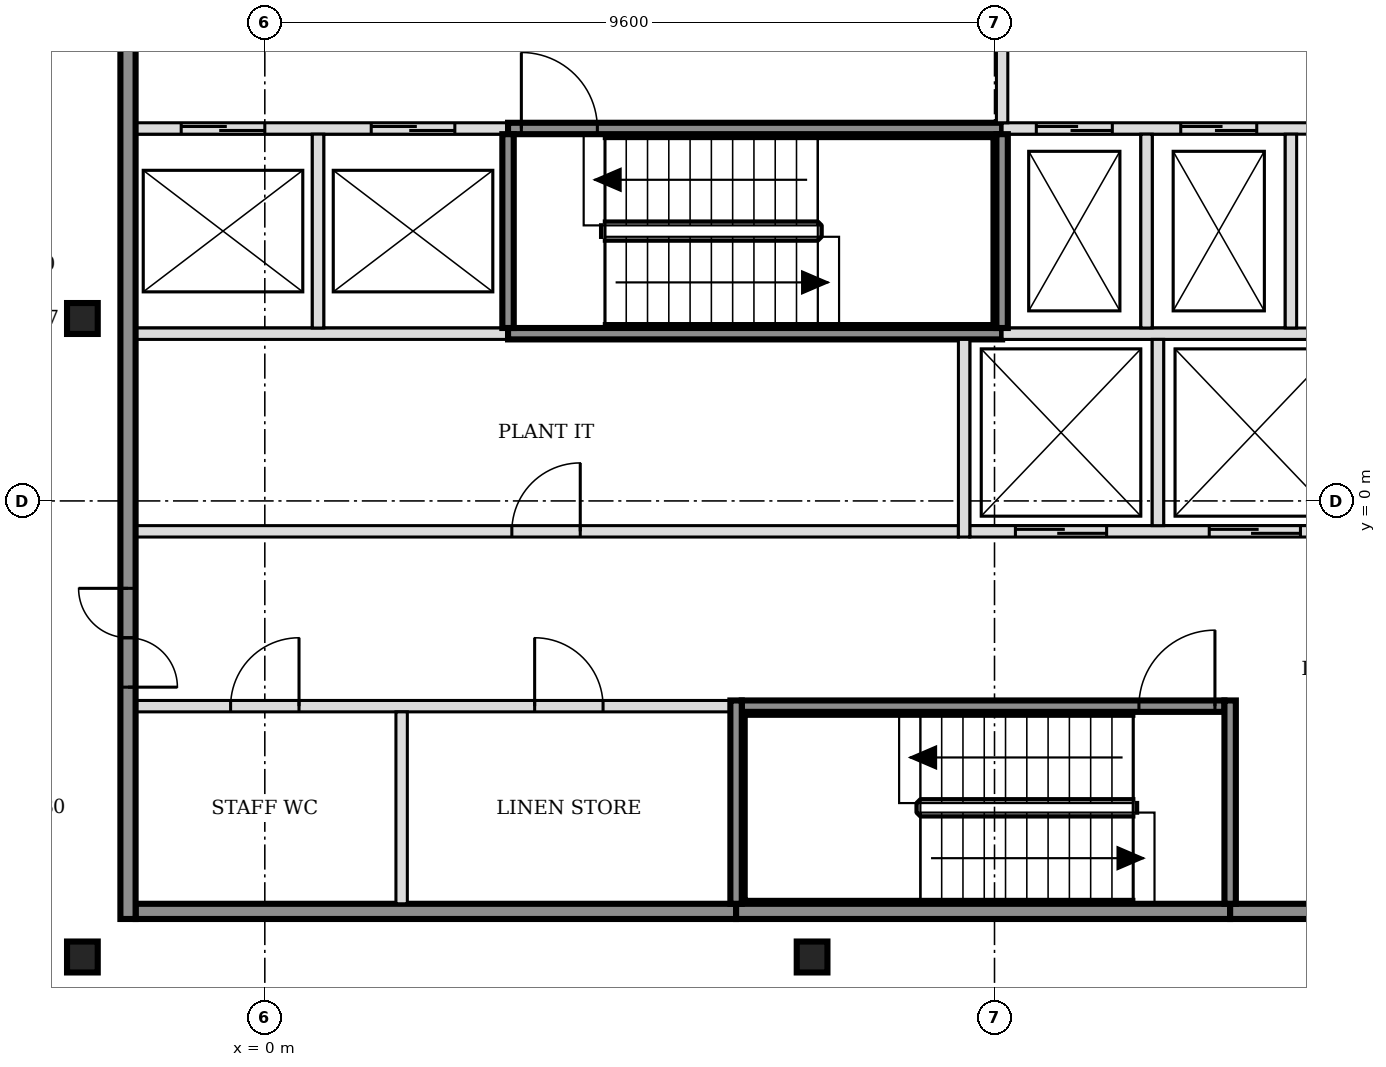
"""IFC4 building model, lengths in metres.
Left out: names, types, materials, properties, quantities, classifications, styles, units other than length and angle.
Written with IfcOpenShell. Run it as: python <this file> out.ifc"""

import sys

from ifc_helpers import new_model, si_unit, direction, frame, frame_2d, origin, origin_2d, place, context, subcontext, project, spatial, rectangle, i_section, extrude, element, fill, save


model = new_model("IFC4")
c1 = context("Model", 3, precision=1e-05, world=origin(), true_north=direction((0.0, 1.0)))
c2 = subcontext(c1, "Body", "Model", "MODEL_VIEW")
j1 = project(units=[si_unit("LENGTHUNIT", "METRE"), si_unit("PLANEANGLEUNIT", "RADIAN")], contexts=[c1])
p1 = place(None, origin())
s1 = spatial("IfcSite", under=j1, at=p1, CompositionType="ELEMENT")
p2 = place(p1, origin())
s2 = spatial("IfcBuilding", under=s1, at=p2, CompositionType="ELEMENT")
p3 = place(p2, frame((0.0, 0.0, 217.8)))
s3 = spatial("IfcBuildingStorey", under=s2, at=p3, CompositionType="ELEMENT", Elevation=217.8)
for number, where, z_axis, x_axis in (
    (1, (-2.4, -6.0, -0.15), (0.0, 0.0, 1.0), (1.0, 0.0, 0.0)),
    (2, (7.2, -6.0, -0.15), (0.0, 0.0, 1.0), (1.0, 0.0, 0.0)),
    (3, (-2.4, 2.4, -0.15), (0.0, 0.0, 1.0), (1.0, 0.0, 0.0)),
):
    element("IfcColumn", number, at=place(p3, frame(where, z_axis=z_axis, x_axis=x_axis)), inside=s3, PredefinedType="COLUMN", context=c2, shape_type="SweptSolid", body=[
        extrude(i_section(OverallWidth=0.404, OverallDepth=0.407, WebThickness=0.027, FlangeThickness=0.044, FilletRadius=0.015, at=origin_2d()), origin(), (0.0, 0.0, 1.0), 3.6),
    ])
p4 = place(p3, frame((-1.7, -5.4, 0.0), z_axis=(0.0, 0.0, 1.0), x_axis=(1.0, 0.0, 0.0)))
e4 = element("IfcWall", 4, at=p4, inside=s3, PredefinedType="SOLIDWALL", context=c2, shape_type="SweptSolid", body=[
    extrude(rectangle(XDim=7.9, YDim=0.2, at=frame_2d((3.95, 0.0))), origin(), (0.0, 0.0, 1.0), 3.45),
])
p5 = place(p3, frame((6.2, -5.4, 0.0), z_axis=(0.0, 0.0, 1.0), x_axis=(1.0, 0.0, 0.0)))
e5 = element("IfcWall", 5, at=p5, inside=s3, PredefinedType="SOLIDWALL", context=c2, shape_type="SweptSolid", body=[
    extrude(rectangle(XDim=6.5, YDim=0.2, at=frame_2d((3.25, 0.0))), origin(), (0.0, 0.0, 1.0), 3.45),
])
p6 = place(p3, frame((12.7, -5.4, 0.0), z_axis=(0.0, 0.0, 1.0), x_axis=(1.0, 0.0, 0.0)))
e6 = element("IfcWall", 6, at=p6, inside=s3, PredefinedType="SOLIDWALL", context=c2, shape_type="SweptSolid", body=[
    extrude(rectangle(XDim=3.4, YDim=0.2, at=frame_2d((1.7, 0.0))), origin(), (0.0, 0.0, 1.0), 3.45),
])
p7 = place(p3, frame((-1.7, -2.7, 0.0), z_axis=(0.0, 0.0, 1.0), x_axis=(1.0, 0.0, 0.0)))
e7 = element("IfcWall", 7, at=p7, inside=s3, PredefinedType="PARTITIONING", context=c2, shape_type="SweptSolid", body=[
    extrude(rectangle(XDim=7.825, YDim=0.15, at=frame_2d((3.913, 0.0))), origin(), (0.0, 0.0, 1.0), 3.45),
])
p8 = place(p7, frame((1.25, 0.0, 0.0)))
e8 = element("IfcOpeningElement", 8, at=p8, cuts=e7, PredefinedType="OPENING", context=c2, shape_type="SweptSolid", body=[
    extrude(rectangle(XDim=0.9, YDim=2.1, at=frame_2d((0.45, 1.05))), frame((0.0, 0.085, 0.0), z_axis=(0.0, -1.0, 0.0), x_axis=(1.0, 0.0, 0.0)), (0.0, 0.0, 1.0), 0.17),
])
p9 = place(p7, frame((5.25, 0.0, 0.0)))
e9 = element("IfcOpeningElement", 9, at=p9, cuts=e7, PredefinedType="OPENING", context=c2, shape_type="SweptSolid", body=[
    extrude(rectangle(XDim=0.9, YDim=2.1, at=frame_2d((0.45, 1.05))), frame((0.0, 0.085, 0.0), z_axis=(0.0, -1.0, 0.0), x_axis=(1.0, 0.0, 0.0)), (0.0, 0.0, 1.0), 0.17),
])
p10 = place(p3, frame((6.275, -2.7, 0.0), z_axis=(0.0, 0.0, 1.0), x_axis=(1.0, 0.0, 0.0)))
e10 = element("IfcWall", 10, at=p10, inside=s3, PredefinedType="SOLIDWALL", context=c2, shape_type="SweptSolid", body=[
    extrude(rectangle(XDim=6.35, YDim=0.15, at=frame_2d((3.175, 0.0))), origin(), (0.0, 0.0, 1.0), 3.45),
])
p11 = place(p10, frame((5.225, 0.0, 0.0)))
e11 = element("IfcOpeningElement", 11, at=p11, cuts=e10, PredefinedType="OPENING", context=c2, shape_type="SweptSolid", body=[
    extrude(rectangle(XDim=1.0, YDim=2.1, at=frame_2d((0.5, 1.05))), frame((0.0, 0.085, 0.0), z_axis=(0.0, -1.0, 0.0), x_axis=(1.0, 0.0, 0.0)), (0.0, 0.0, 1.0), 0.17),
])
p12 = place(p3, frame((-1.7, -0.4, 0.0), z_axis=(0.0, 0.0, 1.0), x_axis=(1.0, 0.0, 0.0)))
e12 = element("IfcWall", 12, at=p12, inside=s3, PredefinedType="PARTITIONING", context=c2, shape_type="SweptSolid", body=[
    extrude(rectangle(XDim=10.825, YDim=0.15, at=frame_2d((5.413, 0.0))), origin(), (0.0, 0.0, 1.0), 3.45),
])
p13 = place(p12, frame((4.95, 0.0, 0.0)))
e13 = element("IfcOpeningElement", 13, at=p13, cuts=e12, PredefinedType="OPENING", context=c2, shape_type="SweptSolid", body=[
    extrude(rectangle(XDim=0.9, YDim=2.1, at=frame_2d((0.45, 1.05))), frame((0.0, 0.085, 0.0), z_axis=(0.0, -1.0, 0.0), x_axis=(1.0, 0.0, 0.0)), (0.0, 0.0, 1.0), 0.17),
])
p14 = place(p3, frame((9.275, -0.4, 0.0), z_axis=(0.0, 0.0, 1.0), x_axis=(1.0, 0.0, 0.0)))
e14 = element("IfcWall", 14, at=p14, inside=s3, PredefinedType="SOLIDWALL", context=c2, shape_type="SweptSolid", body=[
    extrude(rectangle(XDim=4.95, YDim=0.15, at=frame_2d((2.475, 0.0))), origin(), (0.0, 0.0, 1.0), 3.45),
])
p15 = place(p14, frame((0.6, 0.0, 0.0)))
e15 = element("IfcOpeningElement", 15, at=p15, cuts=e14, PredefinedType="OPENING", context=c2, shape_type="SweptSolid", body=[
    extrude(rectangle(XDim=1.2, YDim=2.1, at=frame_2d((0.6, 1.05))), frame((0.0, 0.085, 0.0), z_axis=(0.0, -1.0, 0.0), x_axis=(1.0, 0.0, 0.0)), (0.0, 0.0, 1.0), 0.17),
])
p16 = place(p14, frame((3.15, 0.0, 0.0)))
e16 = element("IfcOpeningElement", 16, at=p16, cuts=e14, PredefinedType="OPENING", context=c2, shape_type="SweptSolid", body=[
    extrude(rectangle(XDim=1.2, YDim=2.1, at=frame_2d((0.6, 1.05))), frame((0.0, 0.085, 0.0), z_axis=(0.0, -1.0, 0.0), x_axis=(1.0, 0.0, 0.0)), (0.0, 0.0, 1.0), 0.17),
])
p17 = place(p3, frame((-1.7, 2.2, 0.0), z_axis=(0.0, 0.0, 1.0), x_axis=(1.0, 0.0, 0.0)))
e17 = element("IfcWall", 17, at=p17, inside=s3, PredefinedType="SOLIDWALL", context=c2, shape_type="SweptSolid", body=[
    extrude(rectangle(XDim=4.9, YDim=0.15, at=frame_2d((2.45, 0.0))), origin(), (0.0, 0.0, 1.0), 3.45),
])
p18 = place(p3, frame((3.2, 2.2, 0.0), z_axis=(0.0, 0.0, 1.0), x_axis=(1.0, 0.0, 0.0)))
e18 = element("IfcWall", 18, at=p18, inside=s3, PredefinedType="SOLIDWALL", context=c2, shape_type="SweptSolid", body=[
    extrude(rectangle(XDim=6.5, YDim=0.15, at=frame_2d((3.25, 0.0))), origin(), (0.0, 0.0, 1.0), 3.45),
])
p19 = place(p3, frame((9.7, 2.2, 0.0), z_axis=(0.0, 0.0, 1.0), x_axis=(1.0, 0.0, 0.0)))
e19 = element("IfcWall", 19, at=p19, inside=s3, PredefinedType="SOLIDWALL", context=c2, shape_type="SweptSolid", body=[
    extrude(rectangle(XDim=4.525, YDim=0.15, at=frame_2d((2.263, 0.0))), origin(), (0.0, 0.0, 1.0), 3.45),
])
p20 = place(p3, frame((-1.7, 4.9, 0.0), z_axis=(0.0, 0.0, 1.0), x_axis=(1.0, 0.0, 0.0)))
e20 = element("IfcWall", 20, at=p20, inside=s3, PredefinedType="SOLIDWALL", context=c2, shape_type="SweptSolid", body=[
    extrude(rectangle(XDim=4.9, YDim=0.15, at=frame_2d((2.45, 0.0))), origin(), (0.0, 0.0, 1.0), 3.45),
])
p21 = place(p20, frame((0.6, 0.0, 0.0)))
e21 = element("IfcOpeningElement", 21, at=p21, cuts=e20, PredefinedType="OPENING", context=c2, shape_type="SweptSolid", body=[
    extrude(rectangle(XDim=1.1, YDim=2.1, at=frame_2d((0.55, 1.05))), frame((0.0, 0.085, 0.0), z_axis=(0.0, -1.0, 0.0), x_axis=(1.0, 0.0, 0.0)), (0.0, 0.0, 1.0), 0.17),
])
p22 = place(p20, frame((3.1, 0.0, 0.0)))
e22 = element("IfcOpeningElement", 22, at=p22, cuts=e20, PredefinedType="OPENING", context=c2, shape_type="SweptSolid", body=[
    extrude(rectangle(XDim=1.1, YDim=2.1, at=frame_2d((0.55, 1.05))), frame((0.0, 0.085, 0.0), z_axis=(0.0, -1.0, 0.0), x_axis=(1.0, 0.0, 0.0)), (0.0, 0.0, 1.0), 0.17),
])
p23 = place(p3, frame((3.2, 4.9, 0.0), z_axis=(0.0, 0.0, 1.0), x_axis=(1.0, 0.0, 0.0)))
e23 = element("IfcWall", 23, at=p23, inside=s3, PredefinedType="SOLIDWALL", context=c2, shape_type="SweptSolid", body=[
    extrude(rectangle(XDim=6.5, YDim=0.15, at=frame_2d((3.25, 0.0))), origin(), (0.0, 0.0, 1.0), 3.45),
])
p24 = place(p23, frame((0.175, 0.0, 0.0)))
e24 = element("IfcOpeningElement", 24, at=p24, cuts=e23, PredefinedType="OPENING", context=c2, shape_type="SweptSolid", body=[
    extrude(rectangle(XDim=1.0, YDim=2.1, at=frame_2d((0.5, 1.05))), frame((0.0, 0.085, 0.0), z_axis=(0.0, -1.0, 0.0), x_axis=(1.0, 0.0, 0.0)), (0.0, 0.0, 1.0), 0.17),
])
p25 = place(p3, frame((9.7, 4.9, 0.0), z_axis=(0.0, 0.0, 1.0), x_axis=(1.0, 0.0, 0.0)))
e25 = element("IfcWall", 25, at=p25, inside=s3, PredefinedType="SOLIDWALL", context=c2, shape_type="SweptSolid", body=[
    extrude(rectangle(XDim=6.4, YDim=0.15, at=frame_2d((3.2, 0.0))), origin(), (0.0, 0.0, 1.0), 3.45),
])
p26 = place(p25, frame((0.45, 0.0, 0.0)))
e26 = element("IfcOpeningElement", 26, at=p26, cuts=e25, PredefinedType="OPENING", context=c2, shape_type="SweptSolid", body=[
    extrude(rectangle(XDim=1.0, YDim=2.1, at=frame_2d((0.5, 1.05))), frame((0.0, 0.085, 0.0), z_axis=(0.0, -1.0, 0.0), x_axis=(1.0, 0.0, 0.0)), (0.0, 0.0, 1.0), 0.17),
])
p27 = place(p25, frame((2.35, 0.0, 0.0)))
e27 = element("IfcOpeningElement", 27, at=p27, cuts=e25, PredefinedType="OPENING", context=c2, shape_type="SweptSolid", body=[
    extrude(rectangle(XDim=1.0, YDim=2.1, at=frame_2d((0.5, 1.05))), frame((0.0, 0.085, 0.0), z_axis=(0.0, -1.0, 0.0), x_axis=(1.0, 0.0, 0.0)), (0.0, 0.0, 1.0), 0.17),
])
p28 = place(p25, frame((4.7, 0.0, 0.0)))
e28 = element("IfcOpeningElement", 28, at=p28, cuts=e25, PredefinedType="OPENING", context=c2, shape_type="SweptSolid", body=[
    extrude(rectangle(XDim=0.9, YDim=2.1, at=frame_2d((0.45, 1.05))), frame((0.0, 0.085, 0.0), z_axis=(0.0, -1.0, 0.0), x_axis=(1.0, 0.0, 0.0)), (0.0, 0.0, 1.0), 0.17),
])
p29 = place(p3, frame((-1.8, -5.5, 0.0), z_axis=(0.0, 0.0, 1.0), x_axis=(0.0, 1.0, 0.0)))
e29 = element("IfcWall", 29, at=p29, inside=s3, PredefinedType="SOLIDWALL", context=c2, shape_type="SweptSolid", body=[
    extrude(rectangle(XDim=15.8, YDim=0.2, at=frame_2d((7.9, 0.0))), origin(), (0.0, 0.0, 1.0), 3.45),
])
p30 = place(p29, frame((3.05, 0.0, 0.0)))
e30 = element("IfcOpeningElement", 30, at=p30, cuts=e29, PredefinedType="OPENING", context=c2, shape_type="SweptSolid", body=[
    extrude(rectangle(XDim=1.3, YDim=2.1, at=frame_2d((0.65, 1.05))), frame((0.0, 0.11, 0.0), z_axis=(0.0, -1.0, 0.0), x_axis=(1.0, 0.0, 0.0)), (0.0, 0.0, 1.0), 0.22),
])
p31 = place(p29, frame((11.45, 0.0, 0.0)))
e31 = element("IfcOpeningElement", 31, at=p31, cuts=e29, PredefinedType="OPENING", context=c2, shape_type="SweptSolid", body=[
    extrude(rectangle(XDim=1.3, YDim=2.1, at=frame_2d((0.65, 1.05))), frame((0.0, 0.11, 0.0), z_axis=(0.0, -1.0, 0.0), x_axis=(1.0, 0.0, 0.0)), (0.0, 0.0, 1.0), 0.22),
])
p32 = place(p3, frame((0.7, 2.275, 0.0), z_axis=(0.0, 0.0, 1.0), x_axis=(0.0, 1.0, 0.0)))
e32 = element("IfcWall", 32, at=p32, inside=s3, PredefinedType="SOLIDWALL", context=c2, shape_type="SweptSolid", body=[
    extrude(rectangle(XDim=2.55, YDim=0.15, at=frame_2d((1.275, 0.0))), origin(), (0.0, 0.0, 1.0), 3.45),
])
p33 = place(p3, frame((1.8, -5.3, 0.0), z_axis=(0.0, 0.0, 1.0), x_axis=(0.0, 1.0, 0.0)))
e33 = element("IfcWall", 33, at=p33, inside=s3, PredefinedType="PARTITIONING", context=c2, shape_type="SweptSolid", body=[
    extrude(rectangle(XDim=2.525, YDim=0.15, at=frame_2d((1.263, 0.0))), origin(), (0.0, 0.0, 1.0), 3.45),
])
p34 = place(p3, frame((3.2, 2.275, 0.0), z_axis=(0.0, 0.0, 1.0), x_axis=(0.0, 1.0, 0.0)))
e34 = element("IfcWall", 34, at=p34, inside=s3, PredefinedType="SOLIDWALL", context=c2, shape_type="SweptSolid", body=[
    extrude(rectangle(XDim=2.55, YDim=0.15, at=frame_2d((1.275, 0.0))), origin(), (0.0, 0.0, 1.0), 3.45),
])
p35 = place(p3, frame((6.2, -5.3, 0.0), z_axis=(0.0, 0.0, 1.0), x_axis=(0.0, 1.0, 0.0)))
e35 = element("IfcWall", 35, at=p35, inside=s3, PredefinedType="SOLIDWALL", context=c2, shape_type="SweptSolid", body=[
    extrude(rectangle(XDim=2.675, YDim=0.15, at=frame_2d((1.337, 0.0))), origin(), (0.0, 0.0, 1.0), 3.45),
])
p36 = place(p3, frame((9.2, -0.475, 0.0), z_axis=(0.0, 0.0, 1.0), x_axis=(0.0, 1.0, 0.0)))
e36 = element("IfcWall", 36, at=p36, inside=s3, PredefinedType="SOLIDWALL", context=c2, shape_type="SweptSolid", body=[
    extrude(rectangle(XDim=2.6, YDim=0.15, at=frame_2d((1.3, 0.0))), origin(), (0.0, 0.0, 1.0), 3.45),
])
p37 = place(p3, frame((9.7, 2.275, 0.0), z_axis=(0.0, 0.0, 1.0), x_axis=(0.0, 1.0, 0.0)))
e37 = element("IfcWall", 37, at=p37, inside=s3, PredefinedType="SOLIDWALL", context=c2, shape_type="SweptSolid", body=[
    extrude(rectangle(XDim=2.55, YDim=0.15, at=frame_2d((1.275, 0.0))), origin(), (0.0, 0.0, 1.0), 3.45),
])
p38 = place(p3, frame((9.7, 4.975, 0.0), z_axis=(0.0, 0.0, 1.0), x_axis=(0.0, 1.0, 0.0)))
e38 = element("IfcWall", 38, at=p38, inside=s3, PredefinedType="SOLIDWALL", context=c2, shape_type="SweptSolid", body=[
    extrude(rectangle(XDim=2.45, YDim=0.15, at=frame_2d((1.225, 0.0))), origin(), (0.0, 0.0, 1.0), 3.45),
])
p39 = place(p3, frame((11.6, 2.275, 0.0), z_axis=(0.0, 0.0, 1.0), x_axis=(0.0, 1.0, 0.0)))
e39 = element("IfcWall", 39, at=p39, inside=s3, PredefinedType="SOLIDWALL", context=c2, shape_type="SweptSolid", body=[
    extrude(rectangle(XDim=2.55, YDim=0.15, at=frame_2d((1.275, 0.0))), origin(), (0.0, 0.0, 1.0), 3.45),
])
p40 = place(p3, frame((11.75, -0.325, 0.0), z_axis=(0.0, 0.0, 1.0), x_axis=(0.0, 1.0, 0.0)))
e40 = element("IfcWall", 40, at=p40, inside=s3, PredefinedType="SOLIDWALL", context=c2, shape_type="SweptSolid", body=[
    extrude(rectangle(XDim=2.45, YDim=0.15, at=frame_2d((1.225, 0.0))), origin(), (0.0, 0.0, 1.0), 3.45),
])
p41 = place(p3, frame((12.7, -5.3, 0.0), z_axis=(0.0, 0.0, 1.0), x_axis=(0.0, 1.0, 0.0)))
e41 = element("IfcWall", 41, at=p41, inside=s3, PredefinedType="SOLIDWALL", context=c2, shape_type="SweptSolid", body=[
    extrude(rectangle(XDim=2.675, YDim=0.15, at=frame_2d((1.337, 0.0))), origin(), (0.0, 0.0, 1.0), 3.45),
])
p42 = place(p3, frame((13.5, 2.275, 0.0), z_axis=(0.0, 0.0, 1.0), x_axis=(0.0, 1.0, 0.0)))
e42 = element("IfcWall", 42, at=p42, inside=s3, PredefinedType="SOLIDWALL", context=c2, shape_type="SweptSolid", body=[
    extrude(rectangle(XDim=2.55, YDim=0.15, at=frame_2d((1.275, 0.0))), origin(), (0.0, 0.0, 1.0), 3.45),
])
p43 = place(p15, origin())
e43 = element("IfcDoor", 43, at=p43, inside=s3, OperationType="DOUBLE_DOOR_SLIDING", PredefinedType="DOOR", context=c2, shape_type="SweptSolid", body=[
    extrude(rectangle(XDim=1.2, YDim=2.1, at=frame_2d((0.6, 1.05))), frame((0.0, 0.025, 0.0), z_axis=(0.0, -1.0, 0.0), x_axis=(1.0, 0.0, 0.0)), (0.0, 0.0, 1.0), 0.05),
])
fill(e15, e43)
p44 = place(p16, origin())
e44 = element("IfcDoor", 44, at=p44, inside=s3, OperationType="DOUBLE_DOOR_SLIDING", PredefinedType="DOOR", context=c2, shape_type="SweptSolid", body=[
    extrude(rectangle(XDim=1.2, YDim=2.1, at=frame_2d((0.6, 1.05))), frame((0.0, 0.025, 0.0), z_axis=(0.0, -1.0, 0.0), x_axis=(1.0, 0.0, 0.0)), (0.0, 0.0, 1.0), 0.05),
])
fill(e16, e44)
p45 = place(p21, origin())
e45 = element("IfcDoor", 45, at=p45, inside=s3, OperationType="DOUBLE_DOOR_SLIDING", PredefinedType="DOOR", context=c2, shape_type="SweptSolid", body=[
    extrude(rectangle(XDim=1.1, YDim=2.1, at=frame_2d((0.55, 1.05))), frame((0.0, 0.025, 0.0), z_axis=(0.0, -1.0, 0.0), x_axis=(1.0, 0.0, 0.0)), (0.0, 0.0, 1.0), 0.05),
])
fill(e21, e45)
p46 = place(p22, origin())
e46 = element("IfcDoor", 46, at=p46, inside=s3, OperationType="DOUBLE_DOOR_SLIDING", PredefinedType="DOOR", context=c2, shape_type="SweptSolid", body=[
    extrude(rectangle(XDim=1.1, YDim=2.1, at=frame_2d((0.55, 1.05))), frame((0.0, 0.025, 0.0), z_axis=(0.0, -1.0, 0.0), x_axis=(1.0, 0.0, 0.0)), (0.0, 0.0, 1.0), 0.05),
])
fill(e22, e46)
p47 = place(p26, origin())
e47 = element("IfcDoor", 47, at=p47, inside=s3, OperationType="DOUBLE_DOOR_SLIDING", PredefinedType="DOOR", context=c2, shape_type="SweptSolid", body=[
    extrude(rectangle(XDim=1.0, YDim=2.1, at=frame_2d((0.5, 1.05))), frame((0.0, 0.025, 0.0), z_axis=(0.0, -1.0, 0.0), x_axis=(1.0, 0.0, 0.0)), (0.0, 0.0, 1.0), 0.05),
])
fill(e26, e47)
p48 = place(p27, origin())
e48 = element("IfcDoor", 48, at=p48, inside=s3, OperationType="DOUBLE_DOOR_SLIDING", PredefinedType="DOOR", context=c2, shape_type="SweptSolid", body=[
    extrude(rectangle(XDim=1.0, YDim=2.1, at=frame_2d((0.5, 1.05))), frame((0.0, 0.025, 0.0), z_axis=(0.0, -1.0, 0.0), x_axis=(1.0, 0.0, 0.0)), (0.0, 0.0, 1.0), 0.05),
])
fill(e27, e48)
p49 = place(p11, origin())
e49 = element("IfcDoor", 49, at=p49, inside=s3, OperationType="SINGLE_SWING_RIGHT", PredefinedType="DOOR", context=c2, shape_type="SweptSolid", body=[
    extrude(rectangle(XDim=1.0, YDim=2.1, at=frame_2d((0.5, 1.05))), frame((0.0, 0.025, 0.0), z_axis=(0.0, -1.0, 0.0), x_axis=(1.0, 0.0, 0.0)), (0.0, 0.0, 1.0), 0.05),
])
fill(e11, e49)
p50 = place(p24, origin())
e50 = element("IfcDoor", 50, at=p50, inside=s3, OperationType="SINGLE_SWING_LEFT", PredefinedType="DOOR", context=c2, shape_type="SweptSolid", body=[
    extrude(rectangle(XDim=1.0, YDim=2.1, at=frame_2d((0.5, 1.05))), frame((0.0, 0.025, 0.0), z_axis=(0.0, -1.0, 0.0), x_axis=(1.0, 0.0, 0.0)), (0.0, 0.0, 1.0), 0.05),
])
fill(e24, e50)
p51 = place(p30, origin())
e51 = element("IfcDoor", 51, at=p51, inside=s3, OperationType="DOUBLE_DOOR_SINGLE_SWING", PredefinedType="DOOR", context=c2, shape_type="SweptSolid", body=[
    extrude(rectangle(XDim=1.3, YDim=2.1, at=frame_2d((0.65, 1.05))), frame((0.0, 0.025, 0.0), z_axis=(0.0, -1.0, 0.0), x_axis=(1.0, 0.0, 0.0)), (0.0, 0.0, 1.0), 0.05),
])
fill(e30, e51)
p52 = place(p8, origin())
e52 = element("IfcDoor", 52, at=p52, inside=s3, OperationType="SINGLE_SWING_RIGHT", PredefinedType="DOOR", context=c2, shape_type="SweptSolid", body=[
    extrude(rectangle(XDim=0.9, YDim=2.1, at=frame_2d((0.45, 1.05))), frame((0.0, 0.025, 0.0), z_axis=(0.0, -1.0, 0.0), x_axis=(1.0, 0.0, 0.0)), (0.0, 0.0, 1.0), 0.05),
])
fill(e8, e52)
p53 = place(p9, origin())
e53 = element("IfcDoor", 53, at=p53, inside=s3, OperationType="SINGLE_SWING_LEFT", PredefinedType="DOOR", context=c2, shape_type="SweptSolid", body=[
    extrude(rectangle(XDim=0.9, YDim=2.1, at=frame_2d((0.45, 1.05))), frame((0.0, 0.025, 0.0), z_axis=(0.0, -1.0, 0.0), x_axis=(1.0, 0.0, 0.0)), (0.0, 0.0, 1.0), 0.05),
])
fill(e9, e53)
p54 = place(p13, origin())
e54 = element("IfcDoor", 54, at=p54, inside=s3, OperationType="SINGLE_SWING_RIGHT", PredefinedType="DOOR", context=c2, shape_type="SweptSolid", body=[
    extrude(rectangle(XDim=0.9, YDim=2.1, at=frame_2d((0.45, 1.05))), frame((0.0, 0.025, 0.0), z_axis=(0.0, -1.0, 0.0), x_axis=(1.0, 0.0, 0.0)), (0.0, 0.0, 1.0), 0.05),
])
fill(e13, e54)
save(model, sys.argv[1])
